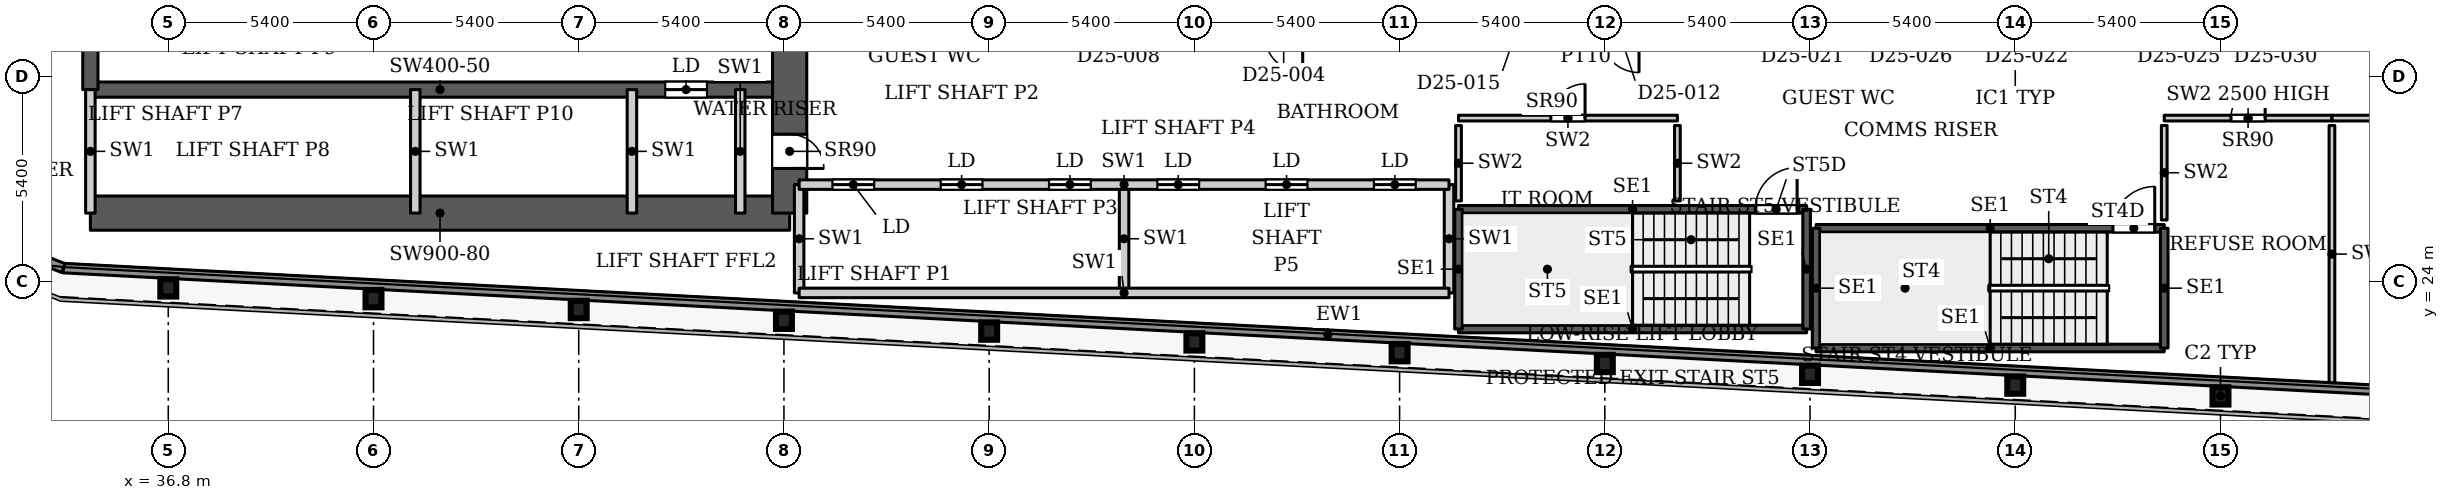
"""IFC4 building model, lengths in metres.
Left out: names, types, materials, properties, quantities, classifications, styles, units other than length and angle.
Written with IfcOpenShell. Run it as: python <this file> out.ifc"""

import sys

from ifc_helpers import new_model, si_unit, direction, frame, frame_2d, origin, origin_2d, place, context, subcontext, project, spatial, rectangle, i_section, extrude, source, transform, mapped, element, fill, save


model = new_model("IFC4")
c1 = context("Model", 3, precision=1e-05, world=origin(), true_north=direction((0.0, 1.0)))
c2 = subcontext(c1, "Body", "Model", "MODEL_VIEW")
j1 = project(units=[si_unit("LENGTHUNIT", "METRE"), si_unit("PLANEANGLEUNIT", "RADIAN")], contexts=[c1])
p1 = place(None, origin())
s1 = spatial("IfcSite", under=j1, at=p1, CompositionType="ELEMENT")
p2 = place(p1, origin())
s2 = spatial("IfcBuilding", under=s1, at=p2, CompositionType="ELEMENT")
p3 = place(p2, frame((0.0, 0.0, 109.7)))
s3 = spatial("IfcBuildingStorey", under=s2, at=p3, CompositionType="ELEMENT", Elevation=109.7)
for number, where, z_axis, x_axis in (
    (1, (90.8, 20.99, 0.0), (0.0, 0.0, 1.0), (1.0, 0.0, 0.0)),
    (2, (85.4, 21.274, 0.0), (0.0, 0.0, 1.0), (1.0, 0.0, 0.0)),
    (3, (80.0, 21.558, 0.0), (0.0, 0.0, 1.0), (1.0, 0.0, 0.0)),
    (4, (74.6, 21.843, 0.0), (0.0, 0.0, 1.0), (1.0, 0.0, 0.0)),
    (5, (69.2, 22.127, 0.0), (0.0, 0.0, 1.0), (1.0, 0.0, 0.0)),
    (6, (63.8, 22.411, 0.0), (0.0, 0.0, 1.0), (1.0, 0.0, 0.0)),
    (7, (58.4, 22.695, 0.0), (0.0, 0.0, 1.0), (1.0, 0.0, 0.0)),
    (8, (53.0, 22.98, 0.0), (0.0, 0.0, 1.0), (1.0, 0.0, 0.0)),
    (9, (47.6, 23.264, 0.0), (0.0, 0.0, 1.0), (1.0, 0.0, 0.0)),
    (10, (42.2, 23.548, 0.0), (0.0, 0.0, 1.0), (1.0, 0.0, 0.0)),
    (11, (36.8, 23.832, 0.0), (0.0, 0.0, 1.0), (1.0, 0.0, 0.0)),
):
    element("IfcColumn", number, at=place(p3, frame(where, z_axis=z_axis, x_axis=x_axis)), inside=s3, PredefinedType="COLUMN", context=c2, shape_type="SweptSolid", body=[
        extrude(i_section(OverallWidth=0.418, OverallDepth=0.455, WebThickness=0.042, FlangeThickness=0.068, FilletRadius=0.014, at=origin_2d()), origin(), (0.0, 0.0, 1.0), 3.9),
    ])
p4 = place(p3, frame((34.75, 25.8, 0.0), z_axis=(0.0, 0.0, 1.0), x_axis=(1.0, 0.0, 0.0)))
e12 = element("IfcWall", 12, at=p4, inside=s3, PredefinedType="SHEAR", context=c2, shape_type="SweptSolid", body=[
    extrude(rectangle(XDim=18.4, YDim=0.9, at=frame_2d((9.2, 0.0))), origin(), (0.0, 0.0, 1.0), 3.9),
])
p5 = place(p3, frame((34.75, 29.05, 0.0), z_axis=(0.0, 0.0, 1.0), x_axis=(1.0, 0.0, 0.0)))
e13 = element("IfcWall", 13, at=p5, inside=s3, PredefinedType="SHEAR", context=c2, shape_type="SweptSolid", body=[
    extrude(rectangle(XDim=18.4, YDim=0.4, at=frame_2d((9.2, 0.0))), origin(), (0.0, 0.0, 1.0), 3.9),
])
p6 = place(p5, frame((15.125, 0.0, 0.0)))
e14 = element("IfcOpeningElement", 14, at=p6, cuts=e13, PredefinedType="OPENING", context=c2, shape_type="SweptSolid", body=[
    extrude(rectangle(XDim=1.1, YDim=2.2, at=frame_2d((0.55, 1.1))), frame((0.0, 0.21, 0.0), z_axis=(0.0, -1.0, 0.0), x_axis=(1.0, 0.0, 0.0)), (0.0, 0.0, 1.0), 0.42),
])
p7 = place(p3, frame((34.75, 29.05, 0.0), z_axis=(0.0, 0.0, 1.0), x_axis=(0.0, 1.0, 0.0)))
e15 = element("IfcWall", 15, at=p7, inside=s3, PredefinedType="SHEAR", context=c2, shape_type="SweptSolid", body=[
    extrude(rectangle(XDim=18.45, YDim=0.4, at=frame_2d((9.225, 0.0))), origin(), (0.0, 0.0, 1.0), 3.9),
])
p8 = place(p7, frame((8.025, 0.0, 0.0)))
e16 = element("IfcOpeningElement", 16, at=p8, cuts=e15, PredefinedType="OPENING", context=c2, shape_type="SweptSolid", body=[
    extrude(rectangle(XDim=1.1, YDim=2.2, at=frame_2d((0.55, 1.1))), frame((0.0, 0.21, 0.0), z_axis=(0.0, -1.0, 0.0), x_axis=(1.0, 0.0, 0.0)), (0.0, 0.0, 1.0), 0.42),
])
p9 = place(p7, frame((10.875, 0.0, 0.0)))
e17 = element("IfcOpeningElement", 17, at=p9, cuts=e15, PredefinedType="OPENING", context=c2, shape_type="SweptSolid", body=[
    extrude(rectangle(XDim=1.1, YDim=2.2, at=frame_2d((0.55, 1.1))), frame((0.0, 0.21, 0.0), z_axis=(0.0, -1.0, 0.0), x_axis=(1.0, 0.0, 0.0)), (0.0, 0.0, 1.0), 0.42),
])
p10 = place(p7, frame((13.725, 0.0, 0.0)))
e18 = element("IfcOpeningElement", 18, at=p10, cuts=e15, PredefinedType="OPENING", context=c2, shape_type="SweptSolid", body=[
    extrude(rectangle(XDim=1.1, YDim=2.2, at=frame_2d((0.55, 1.1))), frame((0.0, 0.21, 0.0), z_axis=(0.0, -1.0, 0.0), x_axis=(1.0, 0.0, 0.0)), (0.0, 0.0, 1.0), 0.42),
])
p11 = place(p7, frame((15.95, 0.0, 0.0)))
e19 = element("IfcOpeningElement", 19, at=p11, cuts=e15, PredefinedType="OPENING", context=c2, shape_type="SweptSolid", body=[
    extrude(rectangle(XDim=1.1, YDim=2.2, at=frame_2d((0.55, 1.1))), frame((0.0, 0.21, 0.0), z_axis=(0.0, -1.0, 0.0), x_axis=(1.0, 0.0, 0.0)), (0.0, 0.0, 1.0), 0.42),
])
p12 = place(p3, frame((53.15, 25.8, 0.0), z_axis=(0.0, 0.0, 1.0), x_axis=(0.0, 1.0, 0.0)))
e20 = element("IfcWall", 20, at=p12, inside=s3, PredefinedType="SHEAR", context=c2, shape_type="SweptSolid", body=[
    extrude(rectangle(XDim=10.4, YDim=0.9, at=frame_2d((5.2, 0.0))), origin(), (0.0, 0.0, 1.0), 3.9),
])
p13 = place(p12, frame((1.175, 0.0, 0.0)))
e21 = element("IfcOpeningElement", 21, at=p13, cuts=e20, PredefinedType="OPENING", context=c2, shape_type="SweptSolid", body=[
    extrude(rectangle(XDim=0.9, YDim=2.2, at=frame_2d((0.45, 1.1))), frame((0.0, 0.46, 0.0), z_axis=(0.0, -1.0, 0.0), x_axis=(1.0, 0.0, 0.0)), (0.0, 0.0, 1.0), 0.92),
])
p14 = place(p3, frame((100.586, 20.85, 0.0), z_axis=(0.0, 0.0, 1.0), x_axis=(-0.99861746497, 0.052565755559, 0.0)))
e22 = element("IfcWall", 22, at=p14, inside=s3, PredefinedType="SOLIDWALL", context=c2, shape_type="SweptSolid", body=[
    extrude(rectangle(XDim=66.639, YDim=0.25, at=frame_2d((33.319, 0.0))), origin(), (0.0, 0.0, 1.0), 3.75),
])
p15 = place(p3, frame((34.039, 24.353, 0.0), z_axis=(0.0, 0.0, 1.0), x_axis=(-0.929352825399, 0.369192803184, 0.0)))
e23 = element("IfcWall", 23, at=p15, inside=s3, PredefinedType="SOLIDWALL", context=c2, shape_type="SweptSolid", body=[
    extrude(rectangle(XDim=4.656, YDim=0.25, at=frame_2d((2.328, 0.0))), origin(), (0.0, 0.0, 1.0), 3.75),
])
p16 = place(p3, frame((80.16, 22.25, 0.0), z_axis=(0.0, 0.0, 1.0), x_axis=(1.0, 0.0, 0.0)))
e24 = element("IfcWall", 24, at=p16, inside=s3, PredefinedType="SHEAR", context=c2, shape_type="SweptSolid", body=[
    extrude(rectangle(XDim=9.16, YDim=0.2, at=frame_2d((4.58, 0.0))), origin(), (0.0, 0.0, 1.0), 3.9),
])
p17 = place(p3, frame((80.16, 25.4, 0.0), z_axis=(0.0, 0.0, 1.0), x_axis=(1.0, 0.0, 0.0)))
e25 = element("IfcWall", 25, at=p17, inside=s3, PredefinedType="SHEAR", context=c2, shape_type="SweptSolid", body=[
    extrude(rectangle(XDim=9.16, YDim=0.2, at=frame_2d((4.58, 0.0))), origin(), (0.0, 0.0, 1.0), 3.9),
])
p18 = place(p17, frame((7.81, 0.0, 0.0)))
e26 = element("IfcOpeningElement", 26, at=p18, cuts=e25, PredefinedType="OPENING", context=c2, shape_type="SweptSolid", body=[
    extrude(rectangle(XDim=1.1, YDim=2.2, at=frame_2d((0.55, 1.1))), frame((0.0, 0.11, 0.0), z_axis=(0.0, -1.0, 0.0), x_axis=(1.0, 0.0, 0.0)), (0.0, 0.0, 1.0), 0.22),
])
for number, where, z_axis, x_axis in (
    (27, (80.16, 22.25, 0.0), (0.0, 0.0, 1.0), (0.0, 1.0, 0.0)),
    (28, (89.32, 22.25, 0.0), (0.0, 0.0, 1.0), (0.0, 1.0, 0.0)),
):
    element("IfcWall", number, at=place(p3, frame(where, z_axis=z_axis, x_axis=x_axis)), inside=s3, PredefinedType="SHEAR", context=c2, shape_type="SweptSolid", body=[
        extrude(rectangle(XDim=3.15, YDim=0.2, at=frame_2d((1.575, 0.0))), origin(), (0.0, 0.0, 1.0), 3.9),
    ])
p19 = place(p3, frame((70.75, 22.75, 0.0), z_axis=(0.0, 0.0, 1.0), x_axis=(1.0, 0.0, 0.0)))
e29 = element("IfcWall", 29, at=p19, inside=s3, PredefinedType="SHEAR", context=c2, shape_type="SweptSolid", body=[
    extrude(rectangle(XDim=9.16, YDim=0.2, at=frame_2d((4.58, 0.0))), origin(), (0.0, 0.0, 1.0), 3.9),
])
p20 = place(p3, frame((70.75, 25.9, 0.0), z_axis=(0.0, 0.0, 1.0), x_axis=(1.0, 0.0, 0.0)))
e30 = element("IfcWall", 30, at=p20, inside=s3, PredefinedType="SHEAR", context=c2, shape_type="SweptSolid", body=[
    extrude(rectangle(XDim=9.16, YDim=0.2, at=frame_2d((4.58, 0.0))), origin(), (0.0, 0.0, 1.0), 3.9),
])
p21 = place(p20, frame((7.81, 0.0, 0.0)))
e31 = element("IfcOpeningElement", 31, at=p21, cuts=e30, PredefinedType="OPENING", context=c2, shape_type="SweptSolid", body=[
    extrude(rectangle(XDim=1.1, YDim=2.2, at=frame_2d((0.55, 1.1))), frame((0.0, 0.11, 0.0), z_axis=(0.0, -1.0, 0.0), x_axis=(1.0, 0.0, 0.0)), (0.0, 0.0, 1.0), 0.22),
])
for number, where, z_axis, x_axis in (
    (32, (70.75, 22.75, 0.0), (0.0, 0.0, 1.0), (0.0, 1.0, 0.0)),
    (33, (79.91, 22.75, 0.0), (0.0, 0.0, 1.0), (0.0, 1.0, 0.0)),
):
    element("IfcWall", number, at=place(p3, frame(where, z_axis=z_axis, x_axis=x_axis)), inside=s3, PredefinedType="SHEAR", context=c2, shape_type="SweptSolid", body=[
        extrude(rectangle(XDim=3.15, YDim=0.2, at=frame_2d((1.575, 0.0))), origin(), (0.0, 0.0, 1.0), 3.9),
    ])
for number, where, z_axis, x_axis in (
    (34, (34.75, 25.8, 0.0), (0.0, 0.0, 1.0), (0.0, 1.0, 0.0)),
    (35, (43.3, 25.8, 0.0), (0.0, 0.0, 1.0), (0.0, 1.0, 0.0)),
    (36, (49.0, 25.8, 0.0), (0.0, 0.0, 1.0), (0.0, 1.0, 0.0)),
    (37, (51.85, 25.8, 0.0), (0.0, 0.0, 1.0), (0.0, 1.0, 0.0)),
):
    element("IfcWall", number, at=place(p3, frame(where, z_axis=z_axis, x_axis=x_axis)), inside=s3, PredefinedType="PARTITIONING", context=c2, shape_type="SweptSolid", body=[
        extrude(rectangle(XDim=3.25, YDim=0.25, at=frame_2d((1.625, 0.0))), origin(), (0.0, 0.0, 1.0), 3.9),
    ])
for number, where, z_axis, x_axis in (
    (38, (53.4, 23.7, 0.0), (0.0, 0.0, 1.0), (0.0, 1.0, 0.0)),
    (39, (61.95, 23.7, 0.0), (0.0, 0.0, 1.0), (0.0, 1.0, 0.0)),
    (40, (70.5, 23.7, 0.0), (0.0, 0.0, 1.0), (0.0, 1.0, 0.0)),
):
    element("IfcWall", number, at=place(p3, frame(where, z_axis=z_axis, x_axis=x_axis)), inside=s3, PredefinedType="PARTITIONING", context=c2, shape_type="SweptSolid", body=[
        extrude(rectangle(XDim=2.85, YDim=0.25, at=frame_2d((1.425, 0.0))), origin(), (0.0, 0.0, 1.0), 3.9),
    ])
p22 = place(p3, frame((53.4, 23.7, 0.0), z_axis=(0.0, 0.0, 1.0), x_axis=(1.0, 0.0, 0.0)))
e41 = element("IfcWall", 41, at=p22, inside=s3, PredefinedType="PARTITIONING", context=c2, shape_type="SweptSolid", body=[
    extrude(rectangle(XDim=17.1, YDim=0.25, at=frame_2d((8.55, 0.0))), origin(), (0.0, 0.0, 1.0), 3.9),
])
p23 = place(p3, frame((53.4, 26.55, 0.0), z_axis=(0.0, 0.0, 1.0), x_axis=(1.0, 0.0, 0.0)))
e42 = element("IfcWall", 42, at=p23, inside=s3, PredefinedType="PARTITIONING", context=c2, shape_type="SweptSolid", body=[
    extrude(rectangle(XDim=17.1, YDim=0.25, at=frame_2d((8.55, 0.0))), origin(), (0.0, 0.0, 1.0), 3.9),
])
p24 = place(p23, frame((0.875, 0.0, 0.0)))
e43 = element("IfcOpeningElement", 43, at=p24, cuts=e42, PredefinedType="OPENING", context=c2, shape_type="SweptSolid", body=[
    extrude(rectangle(XDim=1.1, YDim=2.2, at=frame_2d((0.55, 1.1))), frame((0.0, 0.135, 0.0), z_axis=(0.0, -1.0, 0.0), x_axis=(1.0, 0.0, 0.0)), (0.0, 0.0, 1.0), 0.27),
])
p25 = place(p23, frame((3.725, 0.0, 0.0)))
e44 = element("IfcOpeningElement", 44, at=p25, cuts=e42, PredefinedType="OPENING", context=c2, shape_type="SweptSolid", body=[
    extrude(rectangle(XDim=1.1, YDim=2.2, at=frame_2d((0.55, 1.1))), frame((0.0, 0.135, 0.0), z_axis=(0.0, -1.0, 0.0), x_axis=(1.0, 0.0, 0.0)), (0.0, 0.0, 1.0), 0.27),
])
p26 = place(p23, frame((6.575, 0.0, 0.0)))
e45 = element("IfcOpeningElement", 45, at=p26, cuts=e42, PredefinedType="OPENING", context=c2, shape_type="SweptSolid", body=[
    extrude(rectangle(XDim=1.1, YDim=2.2, at=frame_2d((0.55, 1.1))), frame((0.0, 0.135, 0.0), z_axis=(0.0, -1.0, 0.0), x_axis=(1.0, 0.0, 0.0)), (0.0, 0.0, 1.0), 0.27),
])
p27 = place(p23, frame((9.425, 0.0, 0.0)))
e46 = element("IfcOpeningElement", 46, at=p27, cuts=e42, PredefinedType="OPENING", context=c2, shape_type="SweptSolid", body=[
    extrude(rectangle(XDim=1.1, YDim=2.2, at=frame_2d((0.55, 1.1))), frame((0.0, 0.135, 0.0), z_axis=(0.0, -1.0, 0.0), x_axis=(1.0, 0.0, 0.0)), (0.0, 0.0, 1.0), 0.27),
])
p28 = place(p23, frame((12.275, 0.0, 0.0)))
e47 = element("IfcOpeningElement", 47, at=p28, cuts=e42, PredefinedType="OPENING", context=c2, shape_type="SweptSolid", body=[
    extrude(rectangle(XDim=1.1, YDim=2.2, at=frame_2d((0.55, 1.1))), frame((0.0, 0.135, 0.0), z_axis=(0.0, -1.0, 0.0), x_axis=(1.0, 0.0, 0.0)), (0.0, 0.0, 1.0), 0.27),
])
p29 = place(p23, frame((15.125, 0.0, 0.0)))
e48 = element("IfcOpeningElement", 48, at=p29, cuts=e42, PredefinedType="OPENING", context=c2, shape_type="SweptSolid", body=[
    extrude(rectangle(XDim=1.1, YDim=2.2, at=frame_2d((0.55, 1.1))), frame((0.0, 0.135, 0.0), z_axis=(0.0, -1.0, 0.0), x_axis=(1.0, 0.0, 0.0)), (0.0, 0.0, 1.0), 0.27),
])
p30 = place(p3, frame((70.75, 28.3, 0.0), z_axis=(0.0, 0.0, 1.0), x_axis=(1.0, 0.0, 0.0)))
e49 = element("IfcWall", 49, at=p30, inside=s3, PredefinedType="PARTITIONING", context=c2, shape_type="SweptSolid", body=[
    extrude(rectangle(XDim=5.76, YDim=0.15, at=frame_2d((2.88, 0.0))), origin(), (0.0, 0.0, 1.0), 3.9),
])
p31 = place(p30, frame((2.43, 0.0, 0.0)))
e50 = element("IfcOpeningElement", 50, at=p31, cuts=e49, PredefinedType="OPENING", context=c2, shape_type="SweptSolid", body=[
    extrude(rectangle(XDim=0.9, YDim=2.2, at=frame_2d((0.45, 1.1))), frame((0.0, 0.085, 0.0), z_axis=(0.0, -1.0, 0.0), x_axis=(1.0, 0.0, 0.0)), (0.0, 0.0, 1.0), 0.17),
])
for number, where, z_axis, x_axis in (
    (51, (70.75, 26.12, 0.0), (0.0, 0.0, 1.0), (0.0, 1.0, 0.0)),
    (52, (76.51, 26.12, 0.0), (0.0, 0.0, 1.0), (0.0, 1.0, 0.0)),
):
    element("IfcWall", number, at=place(p3, frame(where, z_axis=z_axis, x_axis=x_axis)), inside=s3, PredefinedType="PARTITIONING", context=c2, shape_type="SweptSolid", body=[
        extrude(rectangle(XDim=1.985, YDim=0.15, at=frame_2d((0.992, 0.0))), origin(), (0.0, 0.0, 1.0), 3.9),
    ])
p32 = place(p3, frame((89.32, 28.3, 0.0), z_axis=(0.0, 0.0, 1.0), x_axis=(1.0, 0.0, 0.0)))
e53 = element("IfcWall", 53, at=p32, inside=s3, PredefinedType="PARTITIONING", context=c2, shape_type="SweptSolid", body=[
    extrude(rectangle(XDim=4.413, YDim=0.15, at=frame_2d((2.207, 0.0))), origin(), (0.0, 0.0, 1.0), 2.5),
])
p33 = place(p32, frame((1.756, 0.0, 0.0)))
e54 = element("IfcOpeningElement", 54, at=p33, cuts=e53, PredefinedType="OPENING", context=c2, shape_type="SweptSolid", body=[
    extrude(rectangle(XDim=0.9, YDim=2.2, at=frame_2d((0.45, 1.1))), frame((0.0, 0.085, 0.0), z_axis=(0.0, -1.0, 0.0), x_axis=(1.0, 0.0, 0.0)), (0.0, 0.0, 1.0), 0.17),
])
p34 = place(p3, frame((89.32, 25.62, 0.0), z_axis=(0.0, 0.0, 1.0), x_axis=(0.0, 1.0, 0.0)))
e55 = element("IfcWall", 55, at=p34, inside=s3, PredefinedType="PARTITIONING", context=c2, shape_type="SweptSolid", body=[
    extrude(rectangle(XDim=2.485, YDim=0.15, at=frame_2d((1.242, 0.0))), origin(), (0.0, 0.0, 1.0), 3.9),
])
p35 = place(p3, frame((93.733, 21.338, 0.0), z_axis=(0.0, 0.0, 1.0), x_axis=(0.0, 1.0, 0.0)))
e56 = element("IfcWall", 56, at=p35, inside=s3, PredefinedType="PARTITIONING", context=c2, shape_type="SweptSolid", body=[
    extrude(rectangle(XDim=6.767, YDim=0.15, at=frame_2d((3.384, 0.0))), origin(), (0.0, 0.0, 1.0), 3.9),
])
p36 = place(p3, frame((93.733, 28.3, 0.0), z_axis=(0.0, 0.0, 1.0), x_axis=(1.0, 0.0, 0.0)))
e57 = element("IfcWall", 57, at=p36, inside=s3, PredefinedType="PARTITIONING", context=c2, shape_type="SweptSolid", body=[
    extrude(rectangle(XDim=6.165, YDim=0.15, at=frame_2d((3.083, 0.0))), origin(), (0.0, 0.0, 1.0), 3.9),
])
p37 = place(p36, frame((1.683, 0.0, 0.0)))
e58 = element("IfcOpeningElement", 58, at=p37, cuts=e57, PredefinedType="OPENING", context=c2, shape_type="SweptSolid", body=[
    extrude(rectangle(XDim=0.9, YDim=2.2, at=frame_2d((0.45, 1.1))), frame((0.0, 0.085, 0.0), z_axis=(0.0, -1.0, 0.0), x_axis=(1.0, 0.0, 0.0)), (0.0, 0.0, 1.0), 0.17),
])
m1 = source(origin(), c2, "Body", "SweptSolid", [
    extrude(rectangle(XDim=1.1, YDim=2.2, at=frame_2d((0.55, 1.1))), frame((0.0, 0.025, 0.0), z_axis=(0.0, -1.0, 0.0), x_axis=(1.0, 0.0, 0.0)), (0.0, 0.0, 1.0), 0.05),
])
p38 = place(p24, origin())
e59 = element("IfcDoor", 59, at=p38, inside=s3, OperationType="SLIDING_TO_LEFT", PredefinedType="DOOR", context=c2, shape_type="MappedRepresentation", body=[
    mapped(m1, transform((0.0, 0.0, 0.0), x_axis=(1.0, 0.0, 0.0), y_axis=(0.0, 1.0, 0.0), z_axis=(0.0, 0.0, 1.0), scale=1.0)),
])
fill(e43, e59)
p39 = place(p25, origin())
e60 = element("IfcDoor", 60, at=p39, inside=s3, OperationType="SLIDING_TO_LEFT", PredefinedType="DOOR", context=c2, shape_type="MappedRepresentation", body=[
    mapped(m1, transform((0.0, 0.0, 0.0), x_axis=(1.0, 0.0, 0.0), y_axis=(0.0, 1.0, 0.0), z_axis=(0.0, 0.0, 1.0), scale=1.0)),
])
fill(e44, e60)
p40 = place(p26, origin())
e61 = element("IfcDoor", 61, at=p40, inside=s3, OperationType="SLIDING_TO_LEFT", PredefinedType="DOOR", context=c2, shape_type="MappedRepresentation", body=[
    mapped(m1, transform((0.0, 0.0, 0.0), x_axis=(1.0, 0.0, 0.0), y_axis=(0.0, 1.0, 0.0), z_axis=(0.0, 0.0, 1.0), scale=1.0)),
])
fill(e45, e61)
p41 = place(p27, origin())
e62 = element("IfcDoor", 62, at=p41, inside=s3, OperationType="SLIDING_TO_LEFT", PredefinedType="DOOR", context=c2, shape_type="MappedRepresentation", body=[
    mapped(m1, transform((0.0, 0.0, 0.0), x_axis=(1.0, 0.0, 0.0), y_axis=(0.0, 1.0, 0.0), z_axis=(0.0, 0.0, 1.0), scale=1.0)),
])
fill(e46, e62)
p42 = place(p28, origin())
e63 = element("IfcDoor", 63, at=p42, inside=s3, OperationType="SLIDING_TO_LEFT", PredefinedType="DOOR", context=c2, shape_type="MappedRepresentation", body=[
    mapped(m1, transform((0.0, 0.0, 0.0), x_axis=(1.0, 0.0, 0.0), y_axis=(0.0, 1.0, 0.0), z_axis=(0.0, 0.0, 1.0), scale=1.0)),
])
fill(e47, e63)
p43 = place(p29, origin())
e64 = element("IfcDoor", 64, at=p43, inside=s3, OperationType="SLIDING_TO_LEFT", PredefinedType="DOOR", context=c2, shape_type="MappedRepresentation", body=[
    mapped(m1, transform((0.0, 0.0, 0.0), x_axis=(1.0, 0.0, 0.0), y_axis=(0.0, 1.0, 0.0), z_axis=(0.0, 0.0, 1.0), scale=1.0)),
])
fill(e48, e64)
p44 = place(p6, origin())
e65 = element("IfcDoor", 65, at=p44, inside=s3, OperationType="SLIDING_TO_LEFT", PredefinedType="DOOR", context=c2, shape_type="MappedRepresentation", body=[
    mapped(m1, transform((0.0, 0.0, 0.0), x_axis=(1.0, 0.0, 0.0), y_axis=(0.0, 1.0, 0.0), z_axis=(0.0, 0.0, 1.0), scale=1.0)),
])
fill(e14, e65)
m2 = source(origin(), c2, "Body", "SweptSolid", [
    extrude(rectangle(XDim=0.9, YDim=2.2, at=frame_2d((0.45, 1.1))), frame((0.0, 0.025, 0.0), z_axis=(0.0, -1.0, 0.0), x_axis=(1.0, 0.0, 0.0)), (0.0, 0.0, 1.0), 0.05),
])
p45 = place(p13, origin())
e66 = element("IfcDoor", 66, at=p45, inside=s3, OperationType="SINGLE_SWING_RIGHT", PredefinedType="DOOR", context=c2, shape_type="MappedRepresentation", body=[
    mapped(m2, transform((0.0, 0.0, 0.0), x_axis=(1.0, 0.0, 0.0), y_axis=(0.0, 1.0, 0.0), z_axis=(0.0, 0.0, 1.0), scale=1.0)),
])
fill(e21, e66)
p46 = place(p31, origin())
e67 = element("IfcDoor", 67, at=p46, inside=s3, OperationType="SINGLE_SWING_LEFT", PredefinedType="DOOR", context=c2, shape_type="MappedRepresentation", body=[
    mapped(m2, transform((0.0, 0.0, 0.0), x_axis=(1.0, 0.0, 0.0), y_axis=(0.0, 1.0, 0.0), z_axis=(0.0, 0.0, 1.0), scale=1.0)),
])
fill(e50, e67)
p47 = place(p33, origin())
e68 = element("IfcDoor", 68, at=p47, inside=s3, OperationType="SINGLE_SWING_LEFT", PredefinedType="DOOR", context=c2, shape_type="MappedRepresentation", body=[
    mapped(m2, transform((0.0, 0.0, 0.0), x_axis=(1.0, 0.0, 0.0), y_axis=(0.0, 1.0, 0.0), z_axis=(0.0, 0.0, 1.0), scale=1.0)),
])
fill(e54, e68)
m3 = source(origin(), c2, "Body", "SweptSolid", [
    extrude(rectangle(XDim=1.1, YDim=2.2, at=frame_2d((0.55, 1.1))), frame((0.0, 0.025, 0.0), z_axis=(0.0, -1.0, 0.0), x_axis=(1.0, 0.0, 0.0)), (0.0, 0.0, 1.0), 0.05),
])
p48 = place(p18, origin())
e69 = element("IfcDoor", 69, at=p48, inside=s3, OperationType="SINGLE_SWING_LEFT", PredefinedType="DOOR", context=c2, shape_type="MappedRepresentation", body=[
    mapped(m3, transform((0.0, 0.0, 0.0), x_axis=(1.0, 0.0, 0.0), y_axis=(0.0, 1.0, 0.0), z_axis=(0.0, 0.0, 1.0), scale=1.0)),
])
fill(e26, e69)
p49 = place(p21, origin())
e70 = element("IfcDoor", 70, at=p49, inside=s3, OperationType="SINGLE_SWING_LEFT", PredefinedType="DOOR", context=c2, shape_type="MappedRepresentation", body=[
    mapped(m3, transform((0.0, 0.0, 0.0), x_axis=(1.0, 0.0, 0.0), y_axis=(0.0, 1.0, 0.0), z_axis=(0.0, 0.0, 1.0), scale=1.0)),
])
fill(e31, e70)
save(model, sys.argv[1])
